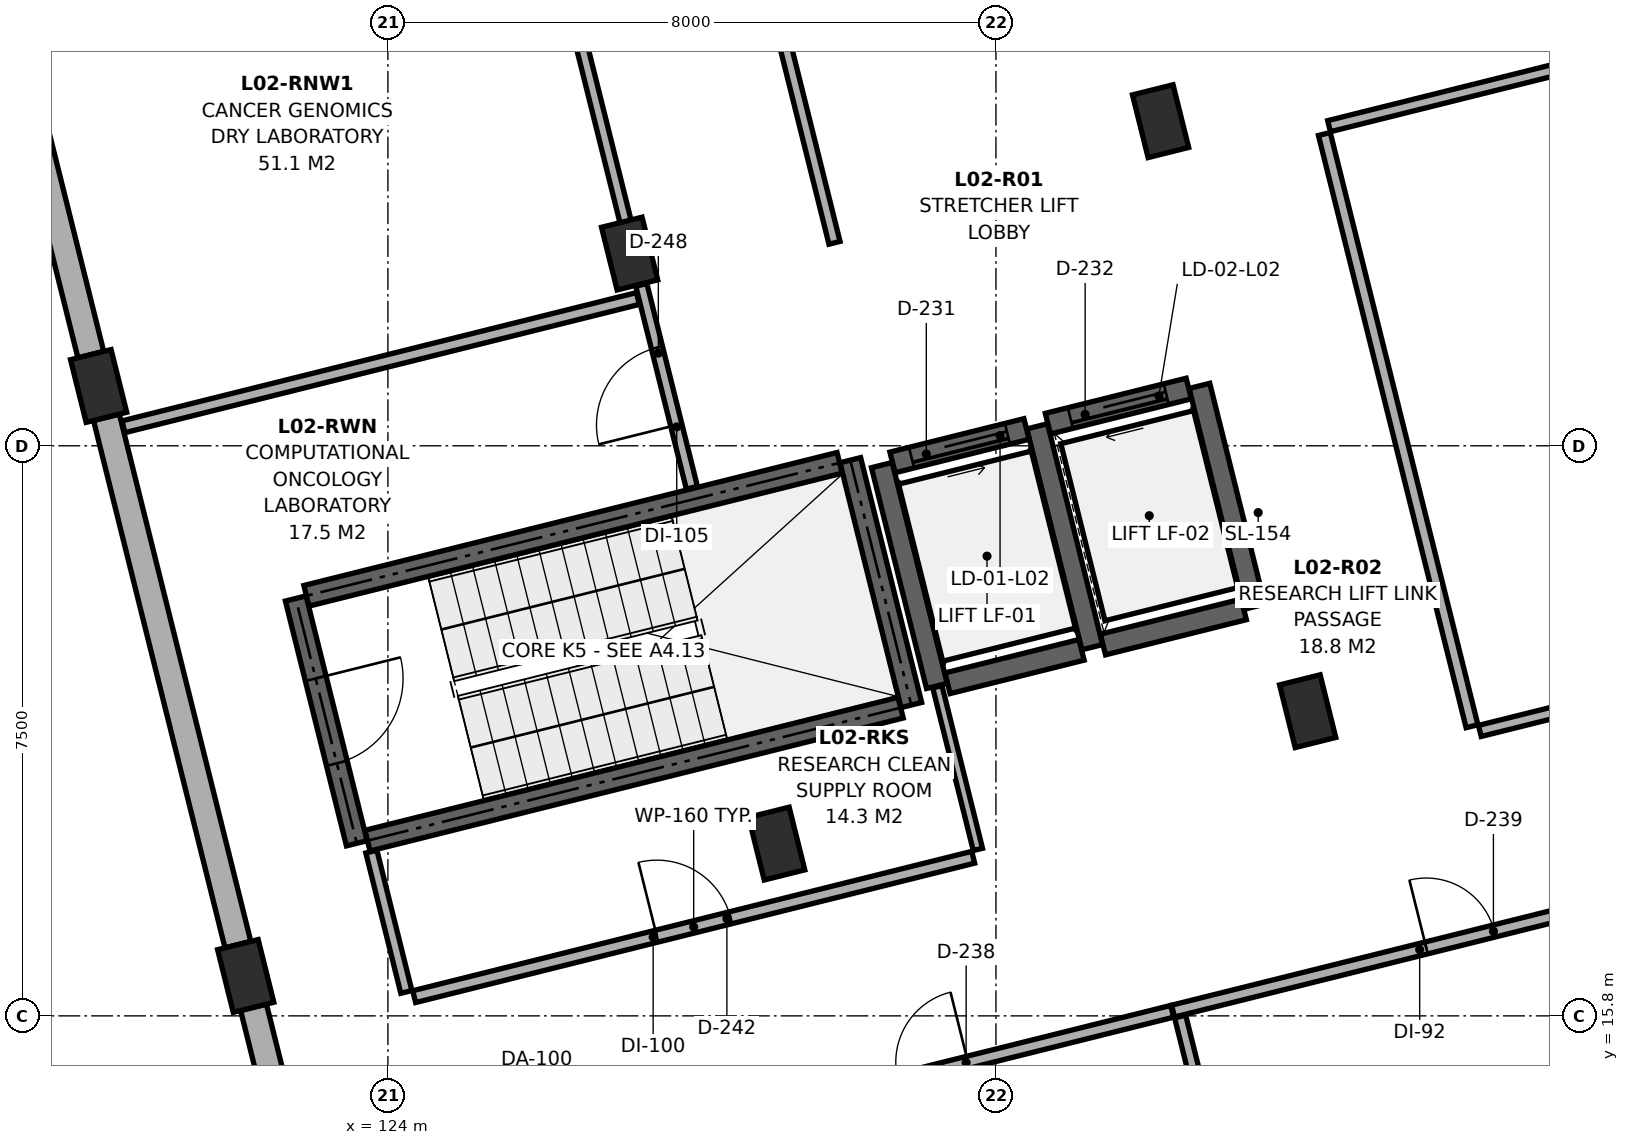
"""IFC4 building model, lengths in metres.
Left out: names, types, materials, properties, quantities, classifications, styles, units other than length and angle.
Written with IfcOpenShell. Run it as: python <this file> out.ifc"""

import sys

from ifc_helpers import new_model, si_unit, direction, frame, frame_2d, origin, origin_2d, place, context, subcontext, project, spatial, rectangle, extrude, element, fill, save


model = new_model("IFC4")
c1 = context("Model", 3, precision=1e-05, world=origin(), true_north=direction((0.0, 1.0)))
c2 = subcontext(c1, "Body", "Model", "MODEL_VIEW")
j1 = project(units=[si_unit("LENGTHUNIT", "METRE"), si_unit("PLANEANGLEUNIT", "RADIAN")], contexts=[c1])
p1 = place(None, origin())
s1 = spatial("IfcSite", under=j1, at=p1, CompositionType="ELEMENT")
p2 = place(p1, origin())
s2 = spatial("IfcBuilding", under=s1, at=p2, CompositionType="ELEMENT")
p3 = place(p2, frame((0.0, 0.0, 9.5)))
s3 = spatial("IfcBuildingStorey", under=s2, at=p3, CompositionType="ELEMENT", Elevation=9.5)
for number, where, z_axis, x_axis in (
    (1, (122.129, 16.325, 0.0), (0.0, 0.0, 1.0), (0.97, 0.242, 0.0)),
    (2, (120.194, 24.087, 0.0), (0.0, 0.0, 1.0), (0.97, 0.242, 0.0)),
    (3, (129.115, 18.067, 0.0), (0.0, 0.0, 1.0), (0.97, 0.242, 0.0)),
    (4, (127.18, 25.829, 0.0), (0.0, 0.0, 1.0), (0.97, 0.242, 0.0)),
    (5, (136.102, 19.808, 0.0), (0.0, 0.0, 1.0), (0.97, 0.242, 0.0)),
    (6, (134.166, 27.571, 0.0), (0.0, 0.0, 1.0), (0.97, 0.242, 0.0)),
):
    element("IfcColumn", number, at=place(p3, frame(where, z_axis=z_axis, x_axis=x_axis)), inside=s3, PredefinedType="COLUMN", context=c2, shape_type="SweptSolid", body=[
        extrude(rectangle(XDim=0.55, YDim=0.85, at=origin_2d()), origin(), (0.0, 0.0, 1.0), 3.7),
    ])
p4 = place(p3, frame((123.962, 8.975, 0.0), z_axis=(0.0, 0.0, 1.0), x_axis=(-0.241924964772, 0.97029496104, 0.0)))
e7 = element("IfcWall", 7, at=p4, inside=s3, PredefinedType="SOLIDWALL", context=c2, shape_type="SweptSolid", body=[
    extrude(rectangle(XDim=7.15, YDim=0.35, at=frame_2d((3.575, 0.0))), origin(), (0.0, 0.0, 1.0), 2.985),
])
p5 = place(p3, frame((122.026, 16.737, 0.0), z_axis=(0.0, 0.0, 1.0), x_axis=(-0.241916949628, 0.970296959432, 0.0)))
e8 = element("IfcWall", 8, at=p5, inside=s3, PredefinedType="SOLIDWALL", context=c2, shape_type="SweptSolid", body=[
    extrude(rectangle(XDim=7.15, YDim=0.35, at=frame_2d((3.575, 0.0))), origin(), (0.0, 0.0, 1.0), 2.985),
])
p6 = place(p3, frame((120.091, 24.5, 0.0), z_axis=(0.0, 0.0, 1.0), x_axis=(-0.241937193493, 0.970291911955, 0.0)))
e9 = element("IfcWall", 9, at=p6, inside=s3, PredefinedType="SOLIDWALL", context=c2, shape_type="SweptSolid", body=[
    extrude(rectangle(XDim=7.2, YDim=0.35, at=frame_2d((3.6, 0.0))), origin(), (0.0, 0.0, 1.0), 2.985),
])
p7 = place(p3, frame((123.731, 18.105, 0.0), z_axis=(0.0, 0.0, 1.0), x_axis=(0.970297238923, 0.241915828623, 0.0)))
e10 = element("IfcWall", 10, at=p7, inside=s3, PredefinedType="SHEAR", context=c2, shape_type="SweptSolid", body=[
    extrude(rectangle(XDim=7.23, YDim=0.28, at=frame_2d((3.615, 0.0))), origin(), (0.0, 0.0, 1.0), 3.7),
])
p8 = place(p3, frame((130.887, 19.889, 0.0), z_axis=(0.0, 0.0, 1.0), x_axis=(-0.241947258837, 0.970289402158, 0.0)))
e11 = element("IfcWall", 11, at=p8, inside=s3, PredefinedType="SHEAR", context=c2, shape_type="SweptSolid", body=[
    extrude(rectangle(XDim=3.32, YDim=0.28, at=frame_2d((1.66, 0.0))), origin(), (0.0, 0.0, 1.0), 3.7),
])
p9 = place(p3, frame((129.943, 23.076, 0.0), z_axis=(0.0, 0.0, 1.0), x_axis=(-0.970289312034, -0.241947620266, 0.0)))
e12 = element("IfcWall", 12, at=p9, inside=s3, PredefinedType="SHEAR", context=c2, shape_type="SweptSolid", body=[
    extrude(rectangle(XDim=7.23, YDim=0.28, at=frame_2d((3.615, 0.0))), origin(), (0.0, 0.0, 1.0), 3.7),
])
p10 = place(p3, frame((122.787, 21.292, 0.0), z_axis=(0.0, 0.0, 1.0), x_axis=(0.241860763027, -0.970310966293, 0.0)))
e13 = element("IfcWall", 13, at=p10, inside=s3, PredefinedType="SHEAR", context=c2, shape_type="SweptSolid", body=[
    extrude(rectangle(XDim=3.32, YDim=0.28, at=frame_2d((1.66, 0.0))), origin(), (0.0, 0.0, 1.0), 3.7),
])
p11 = place(p10, frame((1.085, 0.0, 0.0)))
e14 = element("IfcOpeningElement", 14, at=p11, cuts=e13, PredefinedType="OPENING", context=c2, shape_type="SweptSolid", body=[
    extrude(rectangle(XDim=1.15, YDim=2.15, at=frame_2d((0.575, 1.075))), frame((0.0, 0.152, 0.0), z_axis=(0.0, -1.0, 0.0), x_axis=(1.0, 0.0, 0.0)), (0.0, 0.0, 1.0), 0.304),
])
p12 = place(p3, frame((131.363, 20.176, 0.0), z_axis=(0.0, 0.0, 1.0), x_axis=(0.970284587517, 0.241966566341, 0.0)))
e15 = element("IfcWall", 15, at=p12, inside=s3, PredefinedType="SHEAR", context=c2, shape_type="SweptSolid", body=[
    extrude(rectangle(XDim=1.817, YDim=0.28, at=frame_2d((0.909, 0.0))), origin(), (0.0, 0.0, 1.0), 3.7),
])
p13 = place(p3, frame((133.267, 20.651, 0.0), z_axis=(0.0, 0.0, 1.0), x_axis=(-0.241921647353, 0.970295788171, 0.0)))
e16 = element("IfcWall", 16, at=p13, inside=s3, PredefinedType="SHEAR", context=c2, shape_type="SweptSolid", body=[
    extrude(rectangle(XDim=2.994, YDim=0.28, at=frame_2d((1.497, 0.0))), origin(), (0.0, 0.0, 1.0), 3.7),
])
p14 = place(p3, frame((132.402, 23.521, 0.0), z_axis=(0.0, 0.0, 1.0), x_axis=(-0.970284587517, -0.241966566341, 0.0)))
e17 = element("IfcWall", 17, at=p14, inside=s3, PredefinedType="SHEAR", context=c2, shape_type="SweptSolid", body=[
    extrude(rectangle(XDim=1.817, YDim=0.28, at=frame_2d((0.909, 0.0))), origin(), (0.0, 0.0, 1.0), 3.7),
])
p15 = place(p14, frame((0.259, 0.0, 0.0)))
e18 = element("IfcOpeningElement", 18, at=p15, cuts=e17, PredefinedType="OPENING", context=c2, shape_type="SweptSolid", body=[
    extrude(rectangle(XDim=1.3, YDim=2.2, at=frame_2d((0.65, 1.1))), frame((0.0, 0.152, 0.0), z_axis=(0.0, -1.0, 0.0), x_axis=(1.0, 0.0, 0.0)), (0.0, 0.0, 1.0), 0.304),
])
p16 = place(p3, frame((130.498, 23.046, 0.0), z_axis=(0.0, 0.0, 1.0), x_axis=(0.241921647353, -0.970295788171, 0.0)))
e19 = element("IfcWall", 19, at=p16, inside=s3, PredefinedType="SHEAR", context=c2, shape_type="SweptSolid", body=[
    extrude(rectangle(XDim=2.994, YDim=0.28, at=frame_2d((1.497, 0.0))), origin(), (0.0, 0.0, 1.0), 3.7),
])
p17 = place(p3, frame((133.408, 20.686, 0.0), z_axis=(0.0, 0.0, 1.0), x_axis=(0.970285190026, 0.241964150272, 0.0)))
e20 = element("IfcWall", 20, at=p17, inside=s3, PredefinedType="SHEAR", context=c2, shape_type="SweptSolid", body=[
    extrude(rectangle(XDim=1.91, YDim=0.28, at=frame_2d((0.955, 0.0))), origin(), (0.0, 0.0, 1.0), 3.7),
])
p18 = place(p3, frame((135.402, 21.183, 0.0), z_axis=(0.0, 0.0, 1.0), x_axis=(-0.241921647353, 0.970295788171, 0.0)))
e21 = element("IfcWall", 21, at=p18, inside=s3, PredefinedType="SHEAR", context=c2, shape_type="SweptSolid", body=[
    extrude(rectangle(XDim=2.994, YDim=0.28, at=frame_2d((1.497, 0.0))), origin(), (0.0, 0.0, 1.0), 3.7),
])
p19 = place(p3, frame((134.537, 24.053, 0.0), z_axis=(0.0, 0.0, 1.0), x_axis=(-0.970285190026, -0.241964150272, 0.0)))
e22 = element("IfcWall", 22, at=p19, inside=s3, PredefinedType="SHEAR", context=c2, shape_type="SweptSolid", body=[
    extrude(rectangle(XDim=1.91, YDim=0.28, at=frame_2d((0.955, 0.0))), origin(), (0.0, 0.0, 1.0), 3.7),
])
p20 = place(p19, frame((0.305, 0.0, 0.0)))
e23 = element("IfcOpeningElement", 23, at=p20, cuts=e22, PredefinedType="OPENING", context=c2, shape_type="SweptSolid", body=[
    extrude(rectangle(XDim=1.3, YDim=2.2, at=frame_2d((0.65, 1.1))), frame((0.0, 0.152, 0.0), z_axis=(0.0, -1.0, 0.0), x_axis=(1.0, 0.0, 0.0)), (0.0, 0.0, 1.0), 0.304),
])
p21 = place(p3, frame((124.346, 16.053, 0.0), z_axis=(0.0, 0.0, 1.0), x_axis=(0.970295772287, 0.241921711059, 0.0)))
e24 = element("IfcWall", 24, at=p21, inside=s3, PredefinedType="PARTITIONING", context=c2, shape_type="SweptSolid", body=[
    extrude(rectangle(XDim=7.58, YDim=0.16, at=frame_2d((3.79, 0.0))), origin(), (0.0, 0.0, 1.0), 2.885),
])
p22 = place(p21, frame((3.29, 0.0, 0.0)))
e25 = element("IfcOpeningElement", 25, at=p22, cuts=e24, PredefinedType="OPENING", context=c2, shape_type="SweptSolid", body=[
    extrude(rectangle(XDim=1.0, YDim=2.15, at=frame_2d((0.5, 1.075))), frame((0.0, 0.092, 0.0), z_axis=(0.0, -1.0, 0.0), x_axis=(1.0, 0.0, 0.0)), (0.0, 0.0, 1.0), 0.184),
])
p23 = place(p3, frame((128.0, 22.748, 0.0), z_axis=(0.0, 0.0, 1.0), x_axis=(-0.241929995817, 0.970293706629, 0.0)))
e26 = element("IfcWall", 26, at=p23, inside=s3, PredefinedType="PARTITIONING", context=c2, shape_type="SweptSolid", body=[
    extrude(rectangle(XDim=2.751, YDim=0.15, at=frame_2d((1.375, 0.0))), origin(), (0.0, 0.0, 1.0), 3.7),
])
p24 = place(p23, frame((0.851, 0.0, 0.0)))
e27 = element("IfcOpeningElement", 27, at=p24, cuts=e26, PredefinedType="OPENING", context=c2, shape_type="SweptSolid", body=[
    extrude(rectangle(XDim=1.05, YDim=2.15, at=frame_2d((0.525, 1.075))), frame((0.0, 0.087, 0.0), z_axis=(0.0, -1.0, 0.0), x_axis=(1.0, 0.0, 0.0)), (0.0, 0.0, 1.0), 0.174),
])
p25 = place(p3, frame((128.023, 14.29, 0.0), z_axis=(0.0, 0.0, 1.0), x_axis=(0.970297244456, 0.24191580643, 0.0)))
e28 = element("IfcWall", 28, at=p25, inside=s3, PredefinedType="PARTITIONING", context=c2, shape_type="SweptSolid", body=[
    extrude(rectangle(XDim=6.488, YDim=0.16, at=frame_2d((3.244, 0.0))), origin(), (0.0, 0.0, 1.0), 2.885),
])
p26 = place(p25, frame((2.769, 0.0, 0.0)))
e29 = element("IfcOpeningElement", 29, at=p26, cuts=e28, PredefinedType="OPENING", context=c2, shape_type="SweptSolid", body=[
    extrude(rectangle(XDim=0.95, YDim=2.15, at=frame_2d((0.475, 1.075))), frame((0.0, 0.092, 0.0), z_axis=(0.0, -1.0, 0.0), x_axis=(1.0, 0.0, 0.0)), (0.0, 0.0, 1.0), 0.184),
])
p27 = place(p3, frame((134.33, 15.863, 0.0), z_axis=(0.0, 0.0, 1.0), x_axis=(0.970299035042, 0.241908624476, 0.0)))
e30 = element("IfcWall", 30, at=p27, inside=s3, PredefinedType="PARTITIONING", context=c2, shape_type="SweptSolid", body=[
    extrude(rectangle(XDim=7.788, YDim=0.16, at=frame_2d((3.894, 0.0))), origin(), (0.0, 0.0, 1.0), 2.885),
])
p28 = place(p27, frame((3.434, 0.0, 0.0)))
e31 = element("IfcOpeningElement", 31, at=p28, cuts=e30, PredefinedType="OPENING", context=c2, shape_type="SweptSolid", body=[
    extrude(rectangle(XDim=0.92, YDim=2.1, at=frame_2d((0.46, 1.05))), frame((0.0, 0.092, 0.0), z_axis=(0.0, -1.0, 0.0), x_axis=(1.0, 0.0, 0.0)), (0.0, 0.0, 1.0), 0.184),
])
p29 = place(p3, frame((138.367, 19.549, 0.0), z_axis=(0.0, 0.0, 1.0), x_axis=(0.970292133333, 0.241936305651, 0.0)))
e32 = element("IfcWall", 32, at=p29, inside=s3, PredefinedType="PARTITIONING", context=c2, shape_type="SweptSolid", body=[
    extrude(rectangle(XDim=12.078, YDim=0.15, at=frame_2d((6.039, 0.0))), origin(), (0.0, 0.0, 1.0), 2.885),
])
p30 = place(p29, frame((5.829, 0.0, 0.0)))
e33 = element("IfcOpeningElement", 33, at=p30, cuts=e32, PredefinedType="OPENING", context=c2, shape_type="SweptSolid", body=[
    extrude(rectangle(XDim=1.08, YDim=2.18, at=frame_2d((0.54, 1.09))), frame((0.0, 0.087, 0.0), z_axis=(0.0, -1.0, 0.0), x_axis=(1.0, 0.0, 0.0)), (0.0, 0.0, 1.0), 0.174),
])
p31 = place(p3, frame((127.215, 25.894, 0.0), z_axis=(0.0, 0.0, 1.0), x_axis=(-0.241942741181, 0.970290528651, 0.0)))
e34 = element("IfcWall", 34, at=p31, inside=s3, PredefinedType="PARTITIONING", context=c2, shape_type="SweptSolid", body=[
    extrude(rectangle(XDim=7.558, YDim=0.15, at=frame_2d((3.779, 0.0))), origin(), (0.0, 0.0, 1.0), 2.885),
])
p32 = place(p31, frame((3.219, 0.0, 0.0)))
e35 = element("IfcOpeningElement", 35, at=p32, cuts=e34, PredefinedType="OPENING", context=c2, shape_type="SweptSolid", body=[
    extrude(rectangle(XDim=1.12, YDim=2.2, at=frame_2d((0.56, 1.1))), frame((0.0, 0.087, 0.0), z_axis=(0.0, -1.0, 0.0), x_axis=(1.0, 0.0, 0.0)), (0.0, 0.0, 1.0), 0.174),
])
p33 = place(p3, frame((129.876, 25.97, 0.0), z_axis=(0.0, 0.0, 1.0), x_axis=(-0.241938716353, 0.970291532236, 0.0)))
e36 = element("IfcWall", 36, at=p33, inside=s3, PredefinedType="PARTITIONING", context=c2, shape_type="SweptSolid", body=[
    extrude(rectangle(XDim=7.411, YDim=0.15, at=frame_2d((3.706, 0.0))), origin(), (0.0, 0.0, 1.0), 2.985),
])
p34 = place(p33, frame((3.085, 0.0, 0.0)))
e37 = element("IfcOpeningElement", 37, at=p34, cuts=e36, PredefinedType="OPENING", context=c2, shape_type="SweptSolid", body=[
    extrude(rectangle(XDim=1.24, YDim=2.2, at=frame_2d((0.62, 1.1))), frame((0.0, 0.087, 0.0), z_axis=(0.0, -1.0, 0.0), x_axis=(1.0, 0.0, 0.0)), (0.0, 0.0, 1.0), 0.174),
])
p35 = place(p3, frame((124.243, 16.115, 0.0), z_axis=(0.0, 0.0, 1.0), x_axis=(-0.241962034071, 0.970285717749, 0.0)))
e38 = element("IfcWall", 38, at=p35, inside=s3, PredefinedType="PARTITIONING", context=c2, shape_type="SweptSolid", body=[
    extrude(rectangle(XDim=1.903, YDim=0.15, at=frame_2d((0.952, 0.0))), origin(), (0.0, 0.0, 1.0), 2.985),
])
p36 = place(p3, frame((131.763, 17.99, 0.0), z_axis=(0.0, 0.0, 1.0), x_axis=(-0.241962612769, 0.970285573438, 0.0)))
e39 = element("IfcWall", 39, at=p36, inside=s3, PredefinedType="PARTITIONING", context=c2, shape_type="SweptSolid", body=[
    extrude(rectangle(XDim=2.206, YDim=0.125, at=frame_2d((1.103, 0.0))), origin(), (0.0, 0.0, 1.0), 2.985),
])
p37 = place(p3, frame((120.521, 23.55, 0.0), z_axis=(0.0, 0.0, 1.0), x_axis=(0.970292595263, 0.241934453059, 0.0)))
e40 = element("IfcWall", 40, at=p37, inside=s3, PredefinedType="PARTITIONING", context=c2, shape_type="SweptSolid", body=[
    extrude(rectangle(XDim=6.976, YDim=0.16, at=frame_2d((3.488, 0.0))), origin(), (0.0, 0.0, 1.0), 2.985),
])
p38 = place(p3, frame((136.122, 8.979, 0.0), z_axis=(0.0, 0.0, 1.0), x_axis=(-0.241913757308, 0.970297755344, 0.0)))
e41 = element("IfcWall", 41, at=p38, inside=s3, PredefinedType="PARTITIONING", context=c2, shape_type="SweptSolid", body=[
    extrude(rectangle(XDim=7.021, YDim=0.15, at=frame_2d((3.51, 0.0))), origin(), (0.0, 0.0, 1.0), 2.985),
])
p39 = place(p3, frame((136.383, 27.505, 0.0), z_axis=(0.0, 0.0, 1.0), x_axis=(0.970296878284, 0.241917275099, 0.0)))
e42 = element("IfcWall", 42, at=p39, inside=s3, PredefinedType="PARTITIONING", context=c2, shape_type="SweptSolid", body=[
    extrude(rectangle(XDim=12.078, YDim=0.15, at=frame_2d((6.039, 0.0))), origin(), (0.0, 0.0, 1.0), 2.885),
])
p40 = place(p3, frame((138.264, 19.611, 0.0), z_axis=(0.0, 0.0, 1.0), x_axis=(-0.241920353256, 0.970296110824, 0.0)))
e43 = element("IfcWall", 43, at=p40, inside=s3, PredefinedType="PARTITIONING", context=c2, shape_type="SweptSolid", body=[
    extrude(rectangle(XDim=8.03, YDim=0.16, at=frame_2d((4.015, 0.0))), origin(), (0.0, 0.0, 1.0), 2.985),
])
p41 = place(p11, origin())
e44 = element("IfcDoor", 44, at=p41, inside=s3, OperationType="SINGLE_SWING_LEFT", PredefinedType="DOOR", context=c2, shape_type="SweptSolid", body=[
    extrude(rectangle(XDim=1.15, YDim=2.15, at=frame_2d((0.575, 1.075))), frame((0.0, 0.025, 0.0), z_axis=(0.0, -1.0, 0.0), x_axis=(1.0, 0.0, 0.0)), (0.0, 0.0, 1.0), 0.05),
])
fill(e14, e44)
p42 = place(p15, origin())
e45 = element("IfcDoor", 45, at=p42, inside=s3, OperationType="SLIDING_TO_LEFT", PredefinedType="DOOR", context=c2, shape_type="SweptSolid", body=[
    extrude(rectangle(XDim=1.3, YDim=2.2, at=frame_2d((0.65, 1.1))), frame((0.0, 0.025, 0.0), z_axis=(0.0, -1.0, 0.0), x_axis=(1.0, 0.0, 0.0)), (0.0, 0.0, 1.0), 0.05),
])
fill(e18, e45)
p43 = place(p20, origin())
e46 = element("IfcDoor", 46, at=p43, inside=s3, OperationType="SLIDING_TO_RIGHT", PredefinedType="DOOR", context=c2, shape_type="SweptSolid", body=[
    extrude(rectangle(XDim=1.3, YDim=2.2, at=frame_2d((0.65, 1.1))), frame((0.0, 0.025, 0.0), z_axis=(0.0, -1.0, 0.0), x_axis=(1.0, 0.0, 0.0)), (0.0, 0.0, 1.0), 0.05),
])
fill(e23, e46)
p44 = place(p22, origin())
e47 = element("IfcDoor", 47, at=p44, inside=s3, OperationType="SINGLE_SWING_LEFT", PredefinedType="DOOR", context=c2, shape_type="SweptSolid", body=[
    extrude(rectangle(XDim=1.0, YDim=2.15, at=frame_2d((0.5, 1.075))), frame((0.0, 0.025, 0.0), z_axis=(0.0, -1.0, 0.0), x_axis=(1.0, 0.0, 0.0)), (0.0, 0.0, 1.0), 0.05),
])
fill(e25, e47)
p45 = place(p24, origin())
e48 = element("IfcDoor", 48, at=p45, inside=s3, OperationType="SINGLE_SWING_LEFT", PredefinedType="DOOR", context=c2, shape_type="SweptSolid", body=[
    extrude(rectangle(XDim=1.05, YDim=2.15, at=frame_2d((0.525, 1.075))), frame((0.0, 0.025, 0.0), z_axis=(0.0, -1.0, 0.0), x_axis=(1.0, 0.0, 0.0)), (0.0, 0.0, 1.0), 0.05),
])
fill(e27, e48)
p46 = place(p26, origin())
e49 = element("IfcDoor", 49, at=p46, inside=s3, OperationType="SINGLE_SWING_RIGHT", PredefinedType="DOOR", context=c2, shape_type="SweptSolid", body=[
    extrude(rectangle(XDim=0.95, YDim=2.15, at=frame_2d((0.475, 1.075))), frame((0.0, 0.025, 0.0), z_axis=(0.0, -1.0, 0.0), x_axis=(1.0, 0.0, 0.0)), (0.0, 0.0, 1.0), 0.05),
])
fill(e29, e49)
p47 = place(p28, origin())
e50 = element("IfcDoor", 50, at=p47, inside=s3, OperationType="SINGLE_SWING_LEFT", PredefinedType="DOOR", context=c2, shape_type="SweptSolid", body=[
    extrude(rectangle(XDim=0.92, YDim=2.1, at=frame_2d((0.46, 1.05))), frame((0.0, 0.025, 0.0), z_axis=(0.0, -1.0, 0.0), x_axis=(1.0, 0.0, 0.0)), (0.0, 0.0, 1.0), 0.05),
])
fill(e31, e50)
save(model, sys.argv[1])
